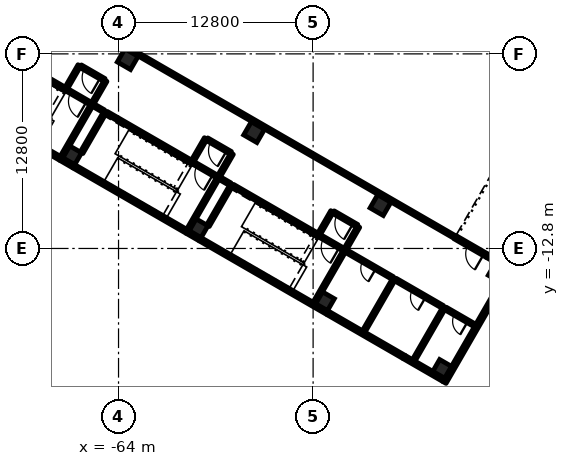
"""IFC4 building model, lengths in metres.
Left out: names, types, materials, properties, quantities, classifications, styles, units other than length and angle.
Written with IfcOpenShell. Run it as: python <this file> out.ifc"""

import sys

from ifc_helpers import new_model, si_unit, direction, frame, frame_2d, origin, origin_2d, place, context, subcontext, project, spatial, rectangle, extrude, element, fill, save


model = new_model("IFC4")
c1 = context("Model", 3, precision=1e-05, world=origin(), true_north=direction((0.0, 1.0)))
c2 = subcontext(c1, "Body", "Model", "MODEL_VIEW")
j1 = project(units=[si_unit("LENGTHUNIT", "METRE"), si_unit("PLANEANGLEUNIT", "RADIAN")], contexts=[c1])
p1 = place(None, origin())
s1 = spatial("IfcSite", under=j1, at=p1, CompositionType="ELEMENT")
p2 = place(p1, origin())
s2 = spatial("IfcBuilding", under=s1, at=p2, CompositionType="ELEMENT")
p3 = place(p2, frame((0.0, 0.0, 6.0)))
s3 = spatial("IfcBuildingStorey", under=s2, at=p3, CompositionType="ELEMENT", Elevation=6.0)
p4 = place(p3, frame((-39.061, -14.399, 0.0), z_axis=(0.0, 0.0, 1.0), x_axis=(-0.5, -0.866025403784, 0.0)))
e1 = element("IfcColumn", 1, at=p4, inside=s3, PredefinedType="COLUMN", context=c2, shape_type="SweptSolid", body=[
    extrude(rectangle(XDim=0.9, YDim=0.9, at=origin_2d()), origin(), (0.0, 0.0, 1.0), 5.4),
])
for number, where, z_axis, x_axis in (
    (2, (-46.768, -9.949, 0.0), (0.0, 0.0, 1.0), (-0.5, -0.866, 0.0)),
    (3, (-55.082, -5.149, 0.0), (0.0, 0.0, 1.0), (-0.5, -0.866, 0.0)),
    (4, (-63.396, -0.349, 0.0), (0.0, 0.0, 1.0), (-0.5, -0.866, 0.0)),
):
    element("IfcColumn", number, at=place(p3, frame(where, z_axis=z_axis, x_axis=x_axis)), inside=s3, PredefinedType="COLUMN", context=c2, shape_type="SweptSolid", body=[
        extrude(rectangle(XDim=1.0, YDim=1.0, at=origin_2d()), origin(), (0.0, 0.0, 1.0), 5.4),
    ])
for number, where, z_axis, x_axis in (
    (5, (-42.71, -20.721, 0.0), (0.0, 0.0, 1.0), (-0.5, -0.866, 0.0)),
    (6, (-50.418, -16.271, 0.0), (0.0, 0.0, 1.0), (-0.5, -0.866, 0.0)),
    (7, (-58.732, -11.471, 0.0), (0.0, 0.0, 1.0), (-0.5, -0.866, 0.0)),
    (8, (-67.046, -6.671, 0.0), (0.0, 0.0, 1.0), (-0.5, -0.866, 0.0)),
):
    element("IfcColumn", number, at=place(p3, frame(where, z_axis=z_axis, x_axis=x_axis)), inside=s3, PredefinedType="COLUMN", context=c2, shape_type="SweptSolid", body=[
        extrude(rectangle(XDim=0.9, YDim=0.9, at=origin_2d()), origin(), (0.0, 0.0, 1.0), 5.4),
    ])
p5 = place(p3, frame((-37.406, -12.684, 0.0), z_axis=(0.0, 0.0, 1.0), x_axis=(-0.500001855621, -0.866024332438, 0.0)))
e9 = element("IfcWall", 9, at=p5, inside=s3, PredefinedType="SOLIDWALL", context=c2, shape_type="SweptSolid", body=[
    extrude(rectangle(XDim=10.312, YDim=0.25, at=frame_2d((5.156, 0.0))), origin(), (0.0, 0.0, 1.0), 5.1),
])
p6 = place(p3, frame((-42.608, -21.444, 0.0), z_axis=(0.0, 0.0, 1.0), x_axis=(-0.866010750942, 0.50002537861, 0.0)))
e10 = element("IfcWall", 10, at=p6, inside=s3, PredefinedType="SOLIDWALL", context=c2, shape_type="SweptSolid", body=[
    extrude(rectangle(XDim=3.0, YDim=0.25, at=frame_2d((1.5, 0.0))), origin(), (0.0, 0.0, 1.0), 5.1),
])
p7 = place(p3, frame((-45.206, -19.944, 0.0), z_axis=(0.0, 0.0, 1.0), x_axis=(-0.866036343161, 0.499981051965, 0.0)))
e11 = element("IfcWall", 11, at=p7, inside=s3, PredefinedType="SOLIDWALL", context=c2, shape_type="SweptSolid", body=[
    extrude(rectangle(XDim=5.775, YDim=0.25, at=frame_2d((2.888, 0.0))), origin(), (0.0, 0.0, 1.0), 5.1),
])
p8 = place(p7, frame((0.25, 0.0, 0.9)))
e12 = element("IfcOpeningElement", 12, at=p8, cuts=e11, PredefinedType="OPENING", context=c2, shape_type="SweptSolid", body=[
    extrude(rectangle(XDim=2.0, YDim=1.8, at=frame_2d((1.0, 0.9))), frame((0.0, 0.135, 0.0), z_axis=(0.0, -1.0, 0.0), x_axis=(1.0, 0.0, 0.0)), (0.0, 0.0, 1.0), 0.27),
])
p9 = place(p7, frame((3.525, 0.0, 0.9)))
e13 = element("IfcOpeningElement", 13, at=p9, cuts=e11, PredefinedType="OPENING", context=c2, shape_type="SweptSolid", body=[
    extrude(rectangle(XDim=2.0, YDim=1.8, at=frame_2d((1.0, 0.9))), frame((0.0, 0.135, 0.0), z_axis=(0.0, -1.0, 0.0), x_axis=(1.0, 0.0, 0.0)), (0.0, 0.0, 1.0), 0.27),
])
p10 = place(p3, frame((-50.208, -17.056, 0.0), z_axis=(0.0, 0.0, 1.0), x_axis=(-0.866023797515, 0.500002782129, 0.0)))
e14 = element("IfcWall", 14, at=p10, inside=s3, PredefinedType="SOLIDWALL", context=c2, shape_type="SweptSolid", body=[
    extrude(rectangle(XDim=9.725, YDim=0.25, at=frame_2d((4.863, 0.0))), origin(), (0.0, 0.0, 1.0), 5.1),
])
p11 = place(p3, frame((-59.496, -11.694, 0.0), z_axis=(0.0, 0.0, 1.0), x_axis=(-0.866021068297, 0.500007509209, 0.0)))
e15 = element("IfcWall", 15, at=p11, inside=s3, PredefinedType="SOLIDWALL", context=c2, shape_type="SweptSolid", body=[
    extrude(rectangle(XDim=8.6, YDim=0.25, at=frame_2d((4.3, 0.0))), origin(), (0.0, 0.0, 1.0), 5.1),
])
p12 = place(p3, frame((-67.81, -6.894, 0.0), z_axis=(0.0, 0.0, 1.0), x_axis=(-0.866028165386, 0.499995216735, 0.0)))
e16 = element("IfcWall", 16, at=p12, inside=s3, PredefinedType="SOLIDWALL", context=c2, shape_type="SweptSolid", body=[
    extrude(rectangle(XDim=8.6, YDim=0.25, at=frame_2d((4.3, 0.0))), origin(), (0.0, 0.0, 1.0), 5.1),
])
for number, where, z_axis, x_axis in (
    (17, (-58.63, -12.194, 0.0), (0.0, 0.0, 1.0), (-0.866, 0.5, 0.0)),
    (18, (-66.944, -7.394, 0.0), (0.0, 0.0, 1.0), (-0.866, 0.5, 0.0)),
):
    element("IfcWall", number, at=place(p3, frame(where, z_axis=z_axis, x_axis=x_axis)), inside=s3, PredefinedType="SOLIDWALL", context=c2, shape_type="SweptSolid", body=[
        extrude(rectangle(XDim=1.0, YDim=0.25, at=frame_2d((0.5, 0.0))), origin(), (0.0, 0.0, 1.0), 5.1),
    ])
p13 = place(p3, frame((-49.119, -12.921, 0.0), z_axis=(0.0, 0.0, 1.0), x_axis=(-0.49999894854, -0.866026010844, 0.0)))
e19 = element("IfcWall", 19, at=p13, inside=s3, PredefinedType="SOLIDWALL", context=c2, shape_type="SweptSolid", body=[
    extrude(rectangle(XDim=4.0, YDim=0.2, at=frame_2d((2.0, 0.0))), origin(), (0.0, 0.0, 1.0), 5.1),
])
p14 = place(p3, frame((-56.567, -8.621, 0.0), z_axis=(0.0, 0.0, 1.0), x_axis=(-0.499933790963, -0.866063626216, 0.0)))
e20 = element("IfcWall", 20, at=p14, inside=s3, PredefinedType="SOLIDWALL", context=c2, shape_type="SweptSolid", body=[
    extrude(rectangle(XDim=3.1, YDim=0.2, at=frame_2d((1.55, 0.0))), origin(), (0.0, 0.0, 1.0), 5.1),
])
p15 = place(p3, frame((-57.433, -8.121, 0.0), z_axis=(0.0, 0.0, 1.0), x_axis=(-0.49999894854, -0.866026010844, 0.0)))
e21 = element("IfcWall", 21, at=p15, inside=s3, PredefinedType="SOLIDWALL", context=c2, shape_type="SweptSolid", body=[
    extrude(rectangle(XDim=4.0, YDim=0.2, at=frame_2d((2.0, 0.0))), origin(), (0.0, 0.0, 1.0), 5.1),
])
p16 = place(p3, frame((-64.881, -3.821, 0.0), z_axis=(0.0, 0.0, 1.0), x_axis=(-0.49999285859, -0.86602952684, 0.0)))
e22 = element("IfcWall", 22, at=p16, inside=s3, PredefinedType="SOLIDWALL", context=c2, shape_type="SweptSolid", body=[
    extrude(rectangle(XDim=3.1, YDim=0.2, at=frame_2d((1.55, 0.0))), origin(), (0.0, 0.0, 1.0), 5.1),
])
p17 = place(p3, frame((-65.747, -3.321, 0.0), z_axis=(0.0, 0.0, 1.0), x_axis=(-0.49999894854, -0.866026010844, 0.0)))
e23 = element("IfcWall", 23, at=p17, inside=s3, PredefinedType="SOLIDWALL", context=c2, shape_type="SweptSolid", body=[
    extrude(rectangle(XDim=4.0, YDim=0.2, at=frame_2d((2.0, 0.0))), origin(), (0.0, 0.0, 1.0), 5.1),
])
p18 = place(p3, frame((-49.206, -12.871, 0.0), z_axis=(0.0, 0.0, 1.0), x_axis=(-0.866036909293, 0.499980071345, 0.0)))
e24 = element("IfcWall", 24, at=p18, inside=s3, PredefinedType="SOLIDWALL", context=c2, shape_type="SweptSolid", body=[
    extrude(rectangle(XDim=1.75, YDim=0.2, at=frame_2d((0.875, 0.0))), origin(), (0.0, 0.0, 1.0), 5.1),
])
p19 = place(p18, frame((0.3, 0.0, 0.0)))
e25 = element("IfcOpeningElement", 25, at=p19, cuts=e24, PredefinedType="OPENING", context=c2, shape_type="SweptSolid", body=[
    extrude(rectangle(XDim=1.2, YDim=2.1, at=frame_2d((0.6, 1.05))), frame((0.0, 0.11, 0.0), z_axis=(0.0, -1.0, 0.0), x_axis=(1.0, 0.0, 0.0)), (0.0, 0.0, 1.0), 0.22),
])
p20 = place(p3, frame((-50.722, -11.996, 0.0), z_axis=(0.0, 0.0, 1.0), x_axis=(-0.866027239912, 0.49999681972, 0.0)))
e26 = element("IfcWall", 26, at=p20, inside=s3, PredefinedType="SOLIDWALL", context=c2, shape_type="SweptSolid", body=[
    extrude(rectangle(XDim=6.65, YDim=0.2, at=frame_2d((3.325, 0.0))), origin(), (0.0, 0.0, 1.0), 5.1),
])
p21 = place(p3, frame((-57.52, -8.071, 0.0), z_axis=(0.0, 0.0, 1.0), x_axis=(-0.866002029911, 0.500040482552, 0.0)))
e27 = element("IfcWall", 27, at=p21, inside=s3, PredefinedType="SOLIDWALL", context=c2, shape_type="SweptSolid", body=[
    extrude(rectangle(XDim=1.75, YDim=0.2, at=frame_2d((0.875, 0.0))), origin(), (0.0, 0.0, 1.0), 5.1),
])
p22 = place(p21, frame((0.3, 0.0, 0.0)))
e28 = element("IfcOpeningElement", 28, at=p22, cuts=e27, PredefinedType="OPENING", context=c2, shape_type="SweptSolid", body=[
    extrude(rectangle(XDim=1.2, YDim=2.1, at=frame_2d((0.6, 1.05))), frame((0.0, 0.11, 0.0), z_axis=(0.0, -1.0, 0.0), x_axis=(1.0, 0.0, 0.0)), (0.0, 0.0, 1.0), 0.22),
])
p23 = place(p3, frame((-59.035, -7.196, 0.0), z_axis=(0.0, 0.0, 1.0), x_axis=(-0.866027239912, 0.49999681972, 0.0)))
e29 = element("IfcWall", 29, at=p23, inside=s3, PredefinedType="SOLIDWALL", context=c2, shape_type="SweptSolid", body=[
    extrude(rectangle(XDim=6.65, YDim=0.2, at=frame_2d((3.325, 0.0))), origin(), (0.0, 0.0, 1.0), 5.1),
])
p24 = place(p3, frame((-65.834, -3.271, 0.0), z_axis=(0.0, 0.0, 1.0), x_axis=(-0.866036909293, 0.499980071345, 0.0)))
e30 = element("IfcWall", 30, at=p24, inside=s3, PredefinedType="SOLIDWALL", context=c2, shape_type="SweptSolid", body=[
    extrude(rectangle(XDim=1.75, YDim=0.2, at=frame_2d((0.875, 0.0))), origin(), (0.0, 0.0, 1.0), 5.1),
])
p25 = place(p24, frame((0.3, 0.0, 0.0)))
e31 = element("IfcOpeningElement", 31, at=p25, cuts=e30, PredefinedType="OPENING", context=c2, shape_type="SweptSolid", body=[
    extrude(rectangle(XDim=1.2, YDim=2.1, at=frame_2d((0.6, 1.05))), frame((0.0, 0.11, 0.0), z_axis=(0.0, -1.0, 0.0), x_axis=(1.0, 0.0, 0.0)), (0.0, 0.0, 1.0), 0.22),
])
p26 = place(p3, frame((-67.349, -2.396, 0.0), z_axis=(0.0, 0.0, 1.0), x_axis=(-0.86601134256, 0.500024353964, 0.0)))
e32 = element("IfcWall", 32, at=p26, inside=s3, PredefinedType="SOLIDWALL", context=c2, shape_type="SweptSolid", body=[
    extrude(rectangle(XDim=6.65, YDim=0.2, at=frame_2d((3.325, 0.0))), origin(), (0.0, 0.0, 1.0), 5.1),
])
for number, where, z_axis, x_axis in (
    (33, (-48.219, -11.363, 0.0), (0.0, 0.0, 1.0), (-0.5, -0.866, 0.0)),
    (34, (-49.951, -10.363, 0.0), (0.0, 0.0, 1.0), (-0.5, -0.866, 0.0)),
):
    element("IfcWall", number, at=place(p3, frame(where, z_axis=z_axis, x_axis=x_axis)), inside=s3, PredefinedType="PARTITIONING", context=c2, shape_type="SweptSolid", body=[
        extrude(rectangle(XDim=1.7, YDim=0.2, at=frame_2d((0.85, 0.0))), origin(), (0.0, 0.0, 1.0), 4.5),
    ])
for number, where, z_axis, x_axis in (
    (35, (-56.533, -6.562, 0.0), (0.0, 0.0, 1.0), (-0.5, -0.866, 0.0)),
    (36, (-58.265, -5.562, 0.0), (0.0, 0.0, 1.0), (-0.5, -0.866, 0.0)),
):
    element("IfcWall", number, at=place(p3, frame(where, z_axis=z_axis, x_axis=x_axis)), inside=s3, PredefinedType="PARTITIONING", context=c2, shape_type="SweptSolid", body=[
        extrude(rectangle(XDim=1.7, YDim=0.2, at=frame_2d((0.85, 0.0))), origin(), (0.0, 0.0, 1.0), 4.5),
    ])
for number, where, z_axis, x_axis in (
    (37, (-64.847, -1.763, 0.0), (0.0, 0.0, 1.0), (-0.5, -0.866, 0.0)),
    (38, (-66.579, -0.763, 0.0), (0.0, 0.0, 1.0), (-0.5, -0.866, 0.0)),
):
    element("IfcWall", number, at=place(p3, frame(where, z_axis=z_axis, x_axis=x_axis)), inside=s3, PredefinedType="PARTITIONING", context=c2, shape_type="SweptSolid", body=[
        extrude(rectangle(XDim=1.7, YDim=0.2, at=frame_2d((0.85, 0.0))), origin(), (0.0, 0.0, 1.0), 4.5),
    ])
p27 = place(p3, frame((-48.306, -11.312, 0.0), z_axis=(0.0, 0.0, 1.0), x_axis=(-0.866047807691, 0.499961193289, 0.0)))
e39 = element("IfcWall", 39, at=p27, inside=s3, PredefinedType="PARTITIONING", context=c2, shape_type="SweptSolid", body=[
    extrude(rectangle(XDim=1.8, YDim=0.2, at=frame_2d((0.9, 0.0))), origin(), (0.0, 0.0, 1.0), 4.5),
])
p28 = place(p27, frame((0.3, 0.0, 0.0)))
e40 = element("IfcOpeningElement", 40, at=p28, cuts=e39, PredefinedType="OPENING", context=c2, shape_type="SweptSolid", body=[
    extrude(rectangle(XDim=1.2, YDim=2.1, at=frame_2d((0.6, 1.05))), frame((0.0, 0.11, 0.0), z_axis=(0.0, -1.0, 0.0), x_axis=(1.0, 0.0, 0.0)), (0.0, 0.0, 1.0), 0.22),
])
p29 = place(p3, frame((-56.62, -6.513, 0.0), z_axis=(0.0, 0.0, 1.0), x_axis=(-0.865989075817, 0.500062916607, 0.0)))
e41 = element("IfcWall", 41, at=p29, inside=s3, PredefinedType="PARTITIONING", context=c2, shape_type="SweptSolid", body=[
    extrude(rectangle(XDim=1.8, YDim=0.2, at=frame_2d((0.9, 0.0))), origin(), (0.0, 0.0, 1.0), 4.5),
])
p30 = place(p29, frame((0.3, 0.0, 0.0)))
e42 = element("IfcOpeningElement", 42, at=p30, cuts=e41, PredefinedType="OPENING", context=c2, shape_type="SweptSolid", body=[
    extrude(rectangle(XDim=1.2, YDim=2.1, at=frame_2d((0.6, 1.05))), frame((0.0, 0.11, 0.0), z_axis=(0.0, -1.0, 0.0), x_axis=(1.0, 0.0, 0.0)), (0.0, 0.0, 1.0), 0.22),
])
p31 = place(p3, frame((-64.934, -1.713, 0.0), z_axis=(0.0, 0.0, 1.0), x_axis=(-0.866022985545, 0.500004188491, 0.0)))
e43 = element("IfcWall", 43, at=p31, inside=s3, PredefinedType="PARTITIONING", context=c2, shape_type="SweptSolid", body=[
    extrude(rectangle(XDim=1.8, YDim=0.2, at=frame_2d((0.9, 0.0))), origin(), (0.0, 0.0, 1.0), 4.5),
])
p32 = place(p31, frame((0.3, 0.0, 0.0)))
e44 = element("IfcOpeningElement", 44, at=p32, cuts=e43, PredefinedType="OPENING", context=c2, shape_type="SweptSolid", body=[
    extrude(rectangle(XDim=1.2, YDim=2.1, at=frame_2d((0.6, 1.05))), frame((0.0, 0.11, 0.0), z_axis=(0.0, -1.0, 0.0), x_axis=(1.0, 0.0, 0.0)), (0.0, 0.0, 1.0), 0.22),
])
p33 = place(p3, frame((-38.358, -14.083, 0.0), z_axis=(0.0, 0.0, 1.0), x_axis=(-0.866055983265, 0.499947031044, 0.0)))
e45 = element("IfcWall", 45, at=p33, inside=s3, PredefinedType="SOLIDWALL", context=c2, shape_type="SweptSolid", body=[
    extrude(rectangle(XDim=1.6, YDim=0.25, at=frame_2d((0.8, 0.0))), origin(), (0.0, 0.0, 1.0), 4.5),
])
p34 = place(p3, frame((-39.744, -13.283, 0.0), z_axis=(0.0, 0.0, 1.0), x_axis=(-0.866014668023, 0.500018594424, 0.0)))
e46 = element("IfcWall", 46, at=p34, inside=s3, PredefinedType="SOLIDWALL", context=c2, shape_type="SweptSolid", body=[
    extrude(rectangle(XDim=2.45, YDim=0.25, at=frame_2d((1.225, 0.0))), origin(), (0.0, 0.0, 1.0), 4.5),
])
p35 = place(p34, frame((0.25, 0.0, 0.0)))
e47 = element("IfcOpeningElement", 47, at=p35, cuts=e46, PredefinedType="OPENING", context=c2, shape_type="SweptSolid", body=[
    extrude(rectangle(XDim=1.2, YDim=2.1, at=frame_2d((0.6, 1.05))), frame((0.0, 0.135, 0.0), z_axis=(0.0, -1.0, 0.0), x_axis=(1.0, 0.0, 0.0)), (0.0, 0.0, 1.0), 0.27),
])
p36 = place(p3, frame((-42.581, -16.696, 0.0), z_axis=(0.0, 0.0, 1.0), x_axis=(-0.49999894854, -0.866026010844, 0.0)))
e48 = element("IfcWall", 48, at=p36, inside=s3, PredefinedType="PARTITIONING", context=c2, shape_type="SweptSolid", body=[
    extrude(rectangle(XDim=4.0, YDim=0.2, at=frame_2d((2.0, 0.0))), origin(), (0.0, 0.0, 1.0), 4.5),
])
p37 = place(p3, frame((-40.546, -17.871, 0.0), z_axis=(0.0, 0.0, 1.0), x_axis=(-0.866017533419, 0.500013631625, 0.0)))
e49 = element("IfcWall", 49, at=p37, inside=s3, PredefinedType="PARTITIONING", context=c2, shape_type="SweptSolid", body=[
    extrude(rectangle(XDim=2.25, YDim=0.2, at=frame_2d((1.125, 0.0))), origin(), (0.0, 0.0, 1.0), 4.5),
])
p38 = place(p37, frame((0.55, 0.0, 0.0)))
e50 = element("IfcOpeningElement", 50, at=p38, cuts=e49, PredefinedType="OPENING", context=c2, shape_type="SweptSolid", body=[
    extrude(rectangle(XDim=1.0, YDim=2.1, at=frame_2d((0.5, 1.05))), frame((0.0, 0.11, 0.0), z_axis=(0.0, -1.0, 0.0), x_axis=(1.0, 0.0, 0.0)), (0.0, 0.0, 1.0), 0.22),
])
p39 = place(p3, frame((-45.872, -14.796, 0.0), z_axis=(0.0, 0.0, 1.0), x_axis=(-0.49999894854, -0.866026010844, 0.0)))
e51 = element("IfcWall", 51, at=p39, inside=s3, PredefinedType="PARTITIONING", context=c2, shape_type="SweptSolid", body=[
    extrude(rectangle(XDim=4.0, YDim=0.2, at=frame_2d((2.0, 0.0))), origin(), (0.0, 0.0, 1.0), 4.5),
])
p40 = place(p3, frame((-42.667, -16.646, 0.0), z_axis=(0.0, 0.0, 1.0), x_axis=(-0.866035395735, 0.499982693035, 0.0)))
e52 = element("IfcWall", 52, at=p40, inside=s3, PredefinedType="PARTITIONING", context=c2, shape_type="SweptSolid", body=[
    extrude(rectangle(XDim=3.6, YDim=0.2, at=frame_2d((1.8, 0.0))), origin(), (0.0, 0.0, 1.0), 4.5),
])
p41 = place(p40, frame((1.3, 0.0, 0.0)))
e53 = element("IfcOpeningElement", 53, at=p41, cuts=e52, PredefinedType="OPENING", context=c2, shape_type="SweptSolid", body=[
    extrude(rectangle(XDim=1.0, YDim=2.1, at=frame_2d((0.5, 1.05))), frame((0.0, 0.11, 0.0), z_axis=(0.0, -1.0, 0.0), x_axis=(1.0, 0.0, 0.0)), (0.0, 0.0, 1.0), 0.22),
])
p42 = place(p3, frame((-45.958, -14.746, 0.0), z_axis=(0.0, 0.0, 1.0), x_axis=(-0.8660424351, 0.499970499736, 0.0)))
e54 = element("IfcWall", 54, at=p42, inside=s3, PredefinedType="PARTITIONING", context=c2, shape_type="SweptSolid", body=[
    extrude(rectangle(XDim=3.55, YDim=0.2, at=frame_2d((1.775, 0.0))), origin(), (0.0, 0.0, 1.0), 4.5),
])
p43 = place(p42, frame((1.275, 0.0, 0.0)))
e55 = element("IfcOpeningElement", 55, at=p43, cuts=e54, PredefinedType="OPENING", context=c2, shape_type="SweptSolid", body=[
    extrude(rectangle(XDim=1.0, YDim=2.1, at=frame_2d((0.5, 1.05))), frame((0.0, 0.11, 0.0), z_axis=(0.0, -1.0, 0.0), x_axis=(1.0, 0.0, 0.0)), (0.0, 0.0, 1.0), 0.22),
])
p44 = place(p3, frame((-41.866, -12.058, 0.0), z_axis=(0.0, 0.0, 1.0), x_axis=(-0.866025540551, 0.499999763114, 0.0)))
e56 = element("IfcWall", 56, at=p44, inside=s3, PredefinedType="PARTITIONING", context=c2, shape_type="SweptSolid", body=[
    extrude(rectangle(XDim=39.4, YDim=0.2, at=frame_2d((19.7, 0.0))), origin(), (0.0, 0.0, 1.0), 4.5),
])
p45 = place(p3, frame((-56.654, -8.571, 0.0), z_axis=(0.0, 0.0, 1.0), x_axis=(-0.866094119867, 0.499880961361, 0.0)))
e57 = element("IfcWall", 57, at=p45, inside=s3, PredefinedType="PARTITIONING", context=c2, shape_type="SweptSolid", body=[
    extrude(rectangle(XDim=0.8, YDim=0.2, at=frame_2d((0.4, 0.0))), origin(), (0.0, 0.0, 1.0), 4.5),
])
p46 = place(p3, frame((-64.968, -3.771, 0.0), z_axis=(0.0, 0.0, 1.0), x_axis=(-0.865885638426, 0.500242002602, 0.0)))
e58 = element("IfcWall", 58, at=p46, inside=s3, PredefinedType="PARTITIONING", context=c2, shape_type="SweptSolid", body=[
    extrude(rectangle(XDim=0.8, YDim=0.2, at=frame_2d((0.4, 0.0))), origin(), (0.0, 0.0, 1.0), 4.5),
])
p47 = place(p8, origin())
e59 = element("IfcWindow", 59, at=p47, inside=s3, PartitioningType="SINGLE_PANEL", PredefinedType="WINDOW", context=c2, shape_type="SweptSolid", body=[
    extrude(rectangle(XDim=2.0, YDim=1.8, at=frame_2d((1.0, 0.9))), frame((0.0, 0.03, 0.0), z_axis=(0.0, -1.0, 0.0), x_axis=(1.0, 0.0, 0.0)), (0.0, 0.0, 1.0), 0.06),
])
fill(e12, e59)
p48 = place(p9, origin())
e60 = element("IfcWindow", 60, at=p48, inside=s3, PartitioningType="SINGLE_PANEL", PredefinedType="WINDOW", context=c2, shape_type="SweptSolid", body=[
    extrude(rectangle(XDim=2.0, YDim=1.8, at=frame_2d((1.0, 0.9))), frame((0.0, 0.03, 0.0), z_axis=(0.0, -1.0, 0.0), x_axis=(1.0, 0.0, 0.0)), (0.0, 0.0, 1.0), 0.06),
])
fill(e13, e60)
p49 = place(p19, origin())
e61 = element("IfcDoor", 61, at=p49, inside=s3, OperationType="SINGLE_SWING_LEFT", PredefinedType="DOOR", context=c2, shape_type="SweptSolid", body=[
    extrude(rectangle(XDim=1.2, YDim=2.1, at=frame_2d((0.6, 1.05))), frame((0.0, 0.025, 0.0), z_axis=(0.0, -1.0, 0.0), x_axis=(1.0, 0.0, 0.0)), (0.0, 0.0, 1.0), 0.05),
])
fill(e25, e61)
p50 = place(p22, origin())
e62 = element("IfcDoor", 62, at=p50, inside=s3, OperationType="SINGLE_SWING_LEFT", PredefinedType="DOOR", context=c2, shape_type="SweptSolid", body=[
    extrude(rectangle(XDim=1.2, YDim=2.1, at=frame_2d((0.6, 1.05))), frame((0.0, 0.025, 0.0), z_axis=(0.0, -1.0, 0.0), x_axis=(1.0, 0.0, 0.0)), (0.0, 0.0, 1.0), 0.05),
])
fill(e28, e62)
p51 = place(p25, origin())
e63 = element("IfcDoor", 63, at=p51, inside=s3, OperationType="SINGLE_SWING_LEFT", PredefinedType="DOOR", context=c2, shape_type="SweptSolid", body=[
    extrude(rectangle(XDim=1.2, YDim=2.1, at=frame_2d((0.6, 1.05))), frame((0.0, 0.025, 0.0), z_axis=(0.0, -1.0, 0.0), x_axis=(1.0, 0.0, 0.0)), (0.0, 0.0, 1.0), 0.05),
])
fill(e31, e63)
p52 = place(p28, origin())
e64 = element("IfcDoor", 64, at=p52, inside=s3, OperationType="SINGLE_SWING_LEFT", PredefinedType="DOOR", context=c2, shape_type="SweptSolid", body=[
    extrude(rectangle(XDim=1.2, YDim=2.1, at=frame_2d((0.6, 1.05))), frame((0.0, 0.025, 0.0), z_axis=(0.0, -1.0, 0.0), x_axis=(1.0, 0.0, 0.0)), (0.0, 0.0, 1.0), 0.05),
])
fill(e40, e64)
p53 = place(p30, origin())
e65 = element("IfcDoor", 65, at=p53, inside=s3, OperationType="SINGLE_SWING_LEFT", PredefinedType="DOOR", context=c2, shape_type="SweptSolid", body=[
    extrude(rectangle(XDim=1.2, YDim=2.1, at=frame_2d((0.6, 1.05))), frame((0.0, 0.025, 0.0), z_axis=(0.0, -1.0, 0.0), x_axis=(1.0, 0.0, 0.0)), (0.0, 0.0, 1.0), 0.05),
])
fill(e42, e65)
p54 = place(p32, origin())
e66 = element("IfcDoor", 66, at=p54, inside=s3, OperationType="SINGLE_SWING_LEFT", PredefinedType="DOOR", context=c2, shape_type="SweptSolid", body=[
    extrude(rectangle(XDim=1.2, YDim=2.1, at=frame_2d((0.6, 1.05))), frame((0.0, 0.025, 0.0), z_axis=(0.0, -1.0, 0.0), x_axis=(1.0, 0.0, 0.0)), (0.0, 0.0, 1.0), 0.05),
])
fill(e44, e66)
p55 = place(p35, origin())
e67 = element("IfcDoor", 67, at=p55, inside=s3, OperationType="SINGLE_SWING_LEFT", PredefinedType="DOOR", context=c2, shape_type="SweptSolid", body=[
    extrude(rectangle(XDim=1.2, YDim=2.1, at=frame_2d((0.6, 1.05))), frame((0.0, 0.025, 0.0), z_axis=(0.0, -1.0, 0.0), x_axis=(1.0, 0.0, 0.0)), (0.0, 0.0, 1.0), 0.05),
])
fill(e47, e67)
p56 = place(p38, origin())
e68 = element("IfcDoor", 68, at=p56, inside=s3, OperationType="SINGLE_SWING_LEFT", PredefinedType="DOOR", context=c2, shape_type="SweptSolid", body=[
    extrude(rectangle(XDim=1.0, YDim=2.1, at=frame_2d((0.5, 1.05))), frame((0.0, 0.025, 0.0), z_axis=(0.0, -1.0, 0.0), x_axis=(1.0, 0.0, 0.0)), (0.0, 0.0, 1.0), 0.05),
])
fill(e50, e68)
p57 = place(p41, origin())
e69 = element("IfcDoor", 69, at=p57, inside=s3, OperationType="SINGLE_SWING_LEFT", PredefinedType="DOOR", context=c2, shape_type="SweptSolid", body=[
    extrude(rectangle(XDim=1.0, YDim=2.1, at=frame_2d((0.5, 1.05))), frame((0.0, 0.025, 0.0), z_axis=(0.0, -1.0, 0.0), x_axis=(1.0, 0.0, 0.0)), (0.0, 0.0, 1.0), 0.05),
])
fill(e53, e69)
p58 = place(p43, origin())
e70 = element("IfcDoor", 70, at=p58, inside=s3, OperationType="SINGLE_SWING_LEFT", PredefinedType="DOOR", context=c2, shape_type="SweptSolid", body=[
    extrude(rectangle(XDim=1.0, YDim=2.1, at=frame_2d((0.5, 1.05))), frame((0.0, 0.025, 0.0), z_axis=(0.0, -1.0, 0.0), x_axis=(1.0, 0.0, 0.0)), (0.0, 0.0, 1.0), 0.05),
])
fill(e55, e70)
save(model, sys.argv[1])
